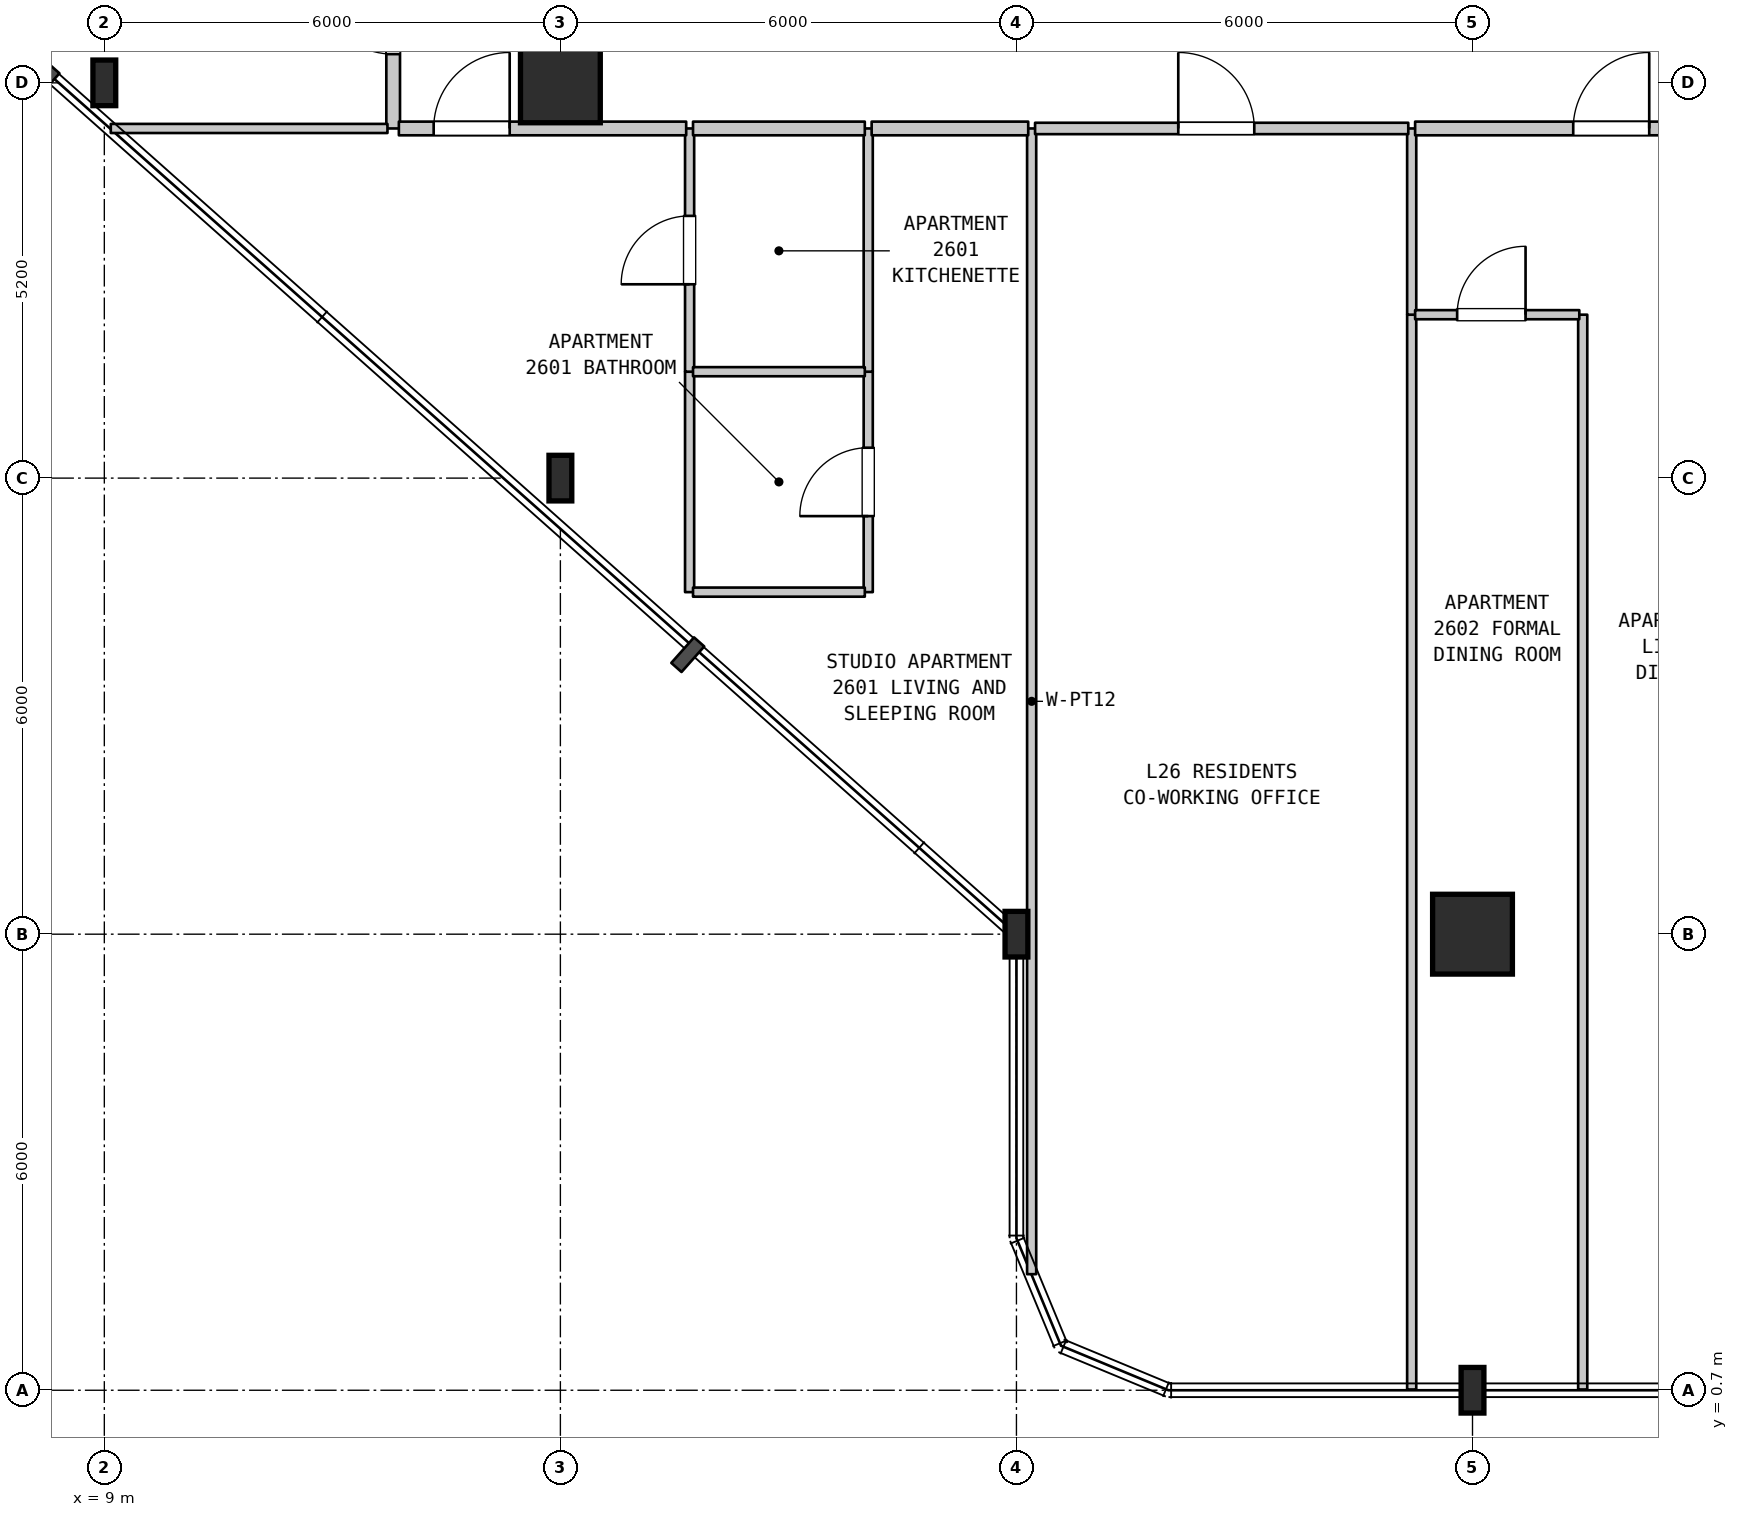
"""IFC4 building model, lengths in metres.
Left out: names, types, materials, properties, quantities, classifications, styles, units other than length and angle.
Written with IfcOpenShell. Run it as: python <this file> out.ifc"""

import sys

from ifc_helpers import new_model, si_unit, direction, frame, frame_2d, origin, origin_2d, place, context, subcontext, project, spatial, rectangle, i_section, extrude, element, fill, save


model = new_model("IFC4")
c1 = context("Model", 3, precision=1e-05, world=origin(), true_north=direction((0.0, 1.0)))
c2 = subcontext(c1, "Body", "Model", "MODEL_VIEW")
j1 = project(units=[si_unit("LENGTHUNIT", "METRE"), si_unit("PLANEANGLEUNIT", "RADIAN")], contexts=[c1])
p1 = place(None, origin())
s1 = spatial("IfcSite", under=j1, at=p1, CompositionType="ELEMENT")
p2 = place(p1, origin())
s2 = spatial("IfcBuilding", under=s1, at=p2, CompositionType="ELEMENT")
p3 = place(p2, frame((0.0, 0.0, 109.4)))
s3 = spatial("IfcBuildingStorey", under=s2, at=p3, CompositionType="ELEMENT", Elevation=109.4)
for number, where, z_axis, x_axis in (
    (1, (9.0, 17.9, 0.0), (0.0, 0.0, 1.0), (1.0, 0.0, 0.0)),
    (2, (15.0, 12.7, 0.0), (0.0, 0.0, 1.0), (1.0, 0.0, 0.0)),
):
    element("IfcColumn", number, at=place(p3, frame(where, z_axis=z_axis, x_axis=x_axis)), inside=s3, PredefinedType="COLUMN", context=c2, shape_type="SweptSolid", body=[
        extrude(i_section(OverallWidth=0.3, OverallDepth=0.6, WebThickness=0.015, FlangeThickness=0.03, FilletRadius=0.027, at=origin_2d()), origin(), (0.0, 0.0, 1.0), 3.7),
    ])
p4 = place(p3, frame((15.0, 17.9, 0.0), z_axis=(0.0, 0.0, 1.0), x_axis=(1.0, 0.0, 0.0)))
e3 = element("IfcColumn", 3, at=p4, inside=s3, PredefinedType="COLUMN", context=c2, shape_type="SweptSolid", body=[
    extrude(rectangle(XDim=1.05, YDim=1.05, at=origin_2d()), origin(), (0.0, 0.0, 1.0), 3.7),
])
for number, where, z_axis, x_axis in (
    (4, (21.0, 6.7, 0.0), (0.0, 0.0, 1.0), (1.0, 0.0, 0.0)),
    (5, (27.0, 0.7, 0.0), (0.0, 0.0, 1.0), (1.0, 0.0, 0.0)),
):
    element("IfcColumn", number, at=place(p3, frame(where, z_axis=z_axis, x_axis=x_axis)), inside=s3, PredefinedType="COLUMN", context=c2, shape_type="SweptSolid", body=[
        extrude(i_section(OverallWidth=0.3, OverallDepth=0.6, WebThickness=0.015, FlangeThickness=0.03, FilletRadius=0.027, at=origin_2d()), origin(), (0.0, 0.0, 1.0), 3.7),
    ])
p5 = place(p3, frame((27.0, 6.7, 0.0), z_axis=(0.0, 0.0, 1.0), x_axis=(1.0, 0.0, 0.0)))
e6 = element("IfcColumn", 6, at=p5, inside=s3, PredefinedType="COLUMN", context=c2, shape_type="SweptSolid", body=[
    extrude(rectangle(XDim=1.05, YDim=1.05, at=origin_2d()), origin(), (0.0, 0.0, 1.0), 3.7),
])
p6 = place(p3, frame((12.8, 17.3, 0.0), z_axis=(0.0, 0.0, 1.0), x_axis=(0.0, 1.0, 0.0)))
e7 = element("IfcWall", 7, at=p6, inside=s3, PredefinedType="STANDARD", context=c2, shape_type="SweptSolid", body=[
    extrude(rectangle(XDim=3.1, YDim=0.18, at=frame_2d((1.55, 0.0))), origin(), (0.0, 0.0, 1.0), 3.385),
])
p7 = place(p6, frame((0.978, 0.0, 0.0)))
e8 = element("IfcOpeningElement", 8, at=p7, cuts=e7, PredefinedType="OPENING", context=c2, shape_type="SweptSolid", body=[
    extrude(rectangle(XDim=1.0, YDim=2.15, at=frame_2d((0.5, 1.075))), frame((0.0, 0.1, 0.0), z_axis=(0.0, -1.0, 0.0), x_axis=(1.0, 0.0, 0.0)), (0.0, 0.0, 1.0), 0.2),
])
p8 = place(p3, frame((16.7, 11.2, 0.0), z_axis=(0.0, 0.0, 1.0), x_axis=(0.0, 1.0, 0.0)))
e9 = element("IfcWall", 9, at=p8, inside=s3, PredefinedType="PARTITIONING", context=c2, shape_type="SweptSolid", body=[
    extrude(rectangle(XDim=2.9, YDim=0.12, at=frame_2d((1.45, 0.0))), origin(), (0.0, 0.0, 1.0), 3.385),
])
p9 = place(p3, frame((16.7, 14.1, 0.0), z_axis=(0.0, 0.0, 1.0), x_axis=(0.0, 1.0, 0.0)))
e10 = element("IfcWall", 10, at=p9, inside=s3, PredefinedType="PARTITIONING", context=c2, shape_type="SweptSolid", body=[
    extrude(rectangle(XDim=3.2, YDim=0.12, at=frame_2d((1.6, 0.0))), origin(), (0.0, 0.0, 1.0), 3.385),
])
p10 = place(p9, frame((1.15, 0.0, 0.0)))
e11 = element("IfcOpeningElement", 11, at=p10, cuts=e10, PredefinedType="OPENING", context=c2, shape_type="SweptSolid", body=[
    extrude(rectangle(XDim=0.9, YDim=2.15, at=frame_2d((0.45, 1.075))), frame((0.0, 0.07, 0.0), z_axis=(0.0, -1.0, 0.0), x_axis=(1.0, 0.0, 0.0)), (0.0, 0.0, 1.0), 0.14),
])
p11 = place(p3, frame((19.05, 11.2, 0.0), z_axis=(0.0, 0.0, 1.0), x_axis=(0.0, 1.0, 0.0)))
e12 = element("IfcWall", 12, at=p11, inside=s3, PredefinedType="PARTITIONING", context=c2, shape_type="SweptSolid", body=[
    extrude(rectangle(XDim=2.9, YDim=0.12, at=frame_2d((1.45, 0.0))), origin(), (0.0, 0.0, 1.0), 3.385),
])
p12 = place(p11, frame((1.0, 0.0, 0.0)))
e13 = element("IfcOpeningElement", 13, at=p12, cuts=e12, PredefinedType="OPENING", context=c2, shape_type="SweptSolid", body=[
    extrude(rectangle(XDim=0.9, YDim=2.1, at=frame_2d((0.45, 1.05))), frame((0.0, 0.07, 0.0), z_axis=(0.0, -1.0, 0.0), x_axis=(1.0, 0.0, 0.0)), (0.0, 0.0, 1.0), 0.14),
])
p13 = place(p3, frame((19.05, 14.1, 0.0), z_axis=(0.0, 0.0, 1.0), x_axis=(0.0, 1.0, 0.0)))
e14 = element("IfcWall", 14, at=p13, inside=s3, PredefinedType="PARTITIONING", context=c2, shape_type="SweptSolid", body=[
    extrude(rectangle(XDim=3.2, YDim=0.12, at=frame_2d((1.6, 0.0))), origin(), (0.0, 0.0, 1.0), 3.385),
])
p14 = place(p3, frame((21.2, 2.227, 0.0), z_axis=(0.0, 0.0, 1.0), x_axis=(0.0, 1.0, 0.0)))
e15 = element("IfcWall", 15, at=p14, inside=s3, PredefinedType="PARTITIONING", context=c2, shape_type="SweptSolid", body=[
    extrude(rectangle(XDim=15.073, YDim=0.12, at=frame_2d((7.537, 0.0))), origin(), (0.0, 0.0, 1.0), 3.385),
])
p15 = place(p3, frame((26.2, 0.71, 0.0), z_axis=(0.0, 0.0, 1.0), x_axis=(0.0, 1.0, 0.0)))
e16 = element("IfcWall", 16, at=p15, inside=s3, PredefinedType="PARTITIONING", context=c2, shape_type="SweptSolid", body=[
    extrude(rectangle(XDim=14.14, YDim=0.12, at=frame_2d((7.07, 0.0))), origin(), (0.0, 0.0, 1.0), 3.385),
])
p16 = place(p3, frame((26.2, 14.85, 0.0), z_axis=(0.0, 0.0, 1.0), x_axis=(0.0, 1.0, 0.0)))
e17 = element("IfcWall", 17, at=p16, inside=s3, PredefinedType="PARTITIONING", context=c2, shape_type="SweptSolid", body=[
    extrude(rectangle(XDim=2.45, YDim=0.12, at=frame_2d((1.225, 0.0))), origin(), (0.0, 0.0, 1.0), 3.385),
])
p17 = place(p3, frame((28.45, 0.71, 0.0), z_axis=(0.0, 0.0, 1.0), x_axis=(0.0, 1.0, 0.0)))
e18 = element("IfcWall", 18, at=p17, inside=s3, PredefinedType="PARTITIONING", context=c2, shape_type="SweptSolid", body=[
    extrude(rectangle(XDim=14.14, YDim=0.12, at=frame_2d((7.07, 0.0))), origin(), (0.0, 0.0, 1.0), 3.385),
])
for number, where, z_axis, x_axis in (
    (19, (16.745, 11.2, 0.0), (0.0, 0.0, 1.0), (1.0, 0.0, 0.0)),
    (20, (16.745, 14.1, 0.0), (0.0, 0.0, 1.0), (1.0, 0.0, 0.0)),
):
    element("IfcWall", number, at=place(p3, frame(where, z_axis=z_axis, x_axis=x_axis)), inside=s3, PredefinedType="PARTITIONING", context=c2, shape_type="SweptSolid", body=[
        extrude(rectangle(XDim=2.26, YDim=0.12, at=frame_2d((1.13, 0.0))), origin(), (0.0, 0.0, 1.0), 3.385),
    ])
p18 = place(p3, frame((26.245, 14.85, 0.0), z_axis=(0.0, 0.0, 1.0), x_axis=(1.0, 0.0, 0.0)))
e21 = element("IfcWall", 21, at=p18, inside=s3, PredefinedType="PARTITIONING", context=c2, shape_type="SweptSolid", body=[
    extrude(rectangle(XDim=2.16, YDim=0.12, at=frame_2d((1.08, 0.0))), origin(), (0.0, 0.0, 1.0), 3.385),
])
p19 = place(p18, frame((0.553, 0.0, 0.0)))
e22 = element("IfcOpeningElement", 22, at=p19, cuts=e21, PredefinedType="OPENING", context=c2, shape_type="SweptSolid", body=[
    extrude(rectangle(XDim=0.9, YDim=2.15, at=frame_2d((0.45, 1.075))), frame((0.0, 0.07, 0.0), z_axis=(0.0, -1.0, 0.0), x_axis=(1.0, 0.0, 0.0)), (0.0, 0.0, 1.0), 0.14),
])
p20 = place(p3, frame((9.085, 17.3, 0.0), z_axis=(0.0, 0.0, 1.0), x_axis=(1.0, 0.0, 0.0)))
e23 = element("IfcWall", 23, at=p20, inside=s3, PredefinedType="PARTITIONING", context=c2, shape_type="SweptSolid", body=[
    extrude(rectangle(XDim=3.64, YDim=0.12, at=frame_2d((1.82, 0.0))), origin(), (0.0, 0.0, 1.0), 3.385),
])
p21 = place(p3, frame((12.875, 17.3, 0.0), z_axis=(0.0, 0.0, 1.0), x_axis=(1.0, 0.0, 0.0)))
e24 = element("IfcWall", 24, at=p21, inside=s3, PredefinedType="STANDARD", context=c2, shape_type="SweptSolid", body=[
    extrude(rectangle(XDim=3.78, YDim=0.18, at=frame_2d((1.89, 0.0))), origin(), (0.0, 0.0, 1.0), 3.385),
])
p22 = place(p21, frame((0.458, 0.0, 0.0)))
e25 = element("IfcOpeningElement", 25, at=p22, cuts=e24, PredefinedType="OPENING", context=c2, shape_type="SweptSolid", body=[
    extrude(rectangle(XDim=1.0, YDim=2.15, at=frame_2d((0.5, 1.075))), frame((0.0, 0.1, 0.0), z_axis=(0.0, -1.0, 0.0), x_axis=(1.0, 0.0, 0.0)), (0.0, 0.0, 1.0), 0.2),
])
p23 = place(p3, frame((16.745, 17.3, 0.0), z_axis=(0.0, 0.0, 1.0), x_axis=(1.0, 0.0, 0.0)))
e26 = element("IfcWall", 26, at=p23, inside=s3, PredefinedType="STANDARD", context=c2, shape_type="SweptSolid", body=[
    extrude(rectangle(XDim=2.26, YDim=0.18, at=frame_2d((1.13, 0.0))), origin(), (0.0, 0.0, 1.0), 3.385),
])
p24 = place(p3, frame((19.095, 17.3, 0.0), z_axis=(0.0, 0.0, 1.0), x_axis=(1.0, 0.0, 0.0)))
e27 = element("IfcWall", 27, at=p24, inside=s3, PredefinedType="STANDARD", context=c2, shape_type="SweptSolid", body=[
    extrude(rectangle(XDim=2.06, YDim=0.18, at=frame_2d((1.03, 0.0))), origin(), (0.0, 0.0, 1.0), 3.385),
])
p25 = place(p3, frame((21.245, 17.3, 0.0), z_axis=(0.0, 0.0, 1.0), x_axis=(1.0, 0.0, 0.0)))
e28 = element("IfcWall", 28, at=p25, inside=s3, PredefinedType="STANDARD", context=c2, shape_type="SweptSolid", body=[
    extrude(rectangle(XDim=4.91, YDim=0.15, at=frame_2d((2.455, 0.0))), origin(), (0.0, 0.0, 1.0), 3.385),
])
p26 = place(p25, frame((1.884, 0.0, 0.0)))
e29 = element("IfcOpeningElement", 29, at=p26, cuts=e28, PredefinedType="OPENING", context=c2, shape_type="SweptSolid", body=[
    extrude(rectangle(XDim=1.0, YDim=2.15, at=frame_2d((0.5, 1.075))), frame((0.0, 0.085, 0.0), z_axis=(0.0, -1.0, 0.0), x_axis=(1.0, 0.0, 0.0)), (0.0, 0.0, 1.0), 0.17),
])
p27 = place(p3, frame((26.245, 17.3, 0.0), z_axis=(0.0, 0.0, 1.0), x_axis=(1.0, 0.0, 0.0)))
e30 = element("IfcWall", 30, at=p27, inside=s3, PredefinedType="STANDARD", context=c2, shape_type="SweptSolid", body=[
    extrude(rectangle(XDim=5.095, YDim=0.18, at=frame_2d((2.547, 0.0))), origin(), (0.0, 0.0, 1.0), 3.385),
])
p28 = place(p27, frame((2.08, 0.0, 0.0)))
e31 = element("IfcOpeningElement", 31, at=p28, cuts=e30, PredefinedType="OPENING", context=c2, shape_type="SweptSolid", body=[
    extrude(rectangle(XDim=1.0, YDim=2.15, at=frame_2d((0.5, 1.075))), frame((0.0, 0.1, 0.0), z_axis=(0.0, -1.0, 0.0), x_axis=(1.0, 0.0, 0.0)), (0.0, 0.0, 1.0), 0.2),
])
p29 = place(p7, origin())
e32 = element("IfcDoor", 32, at=p29, inside=s3, OperationType="SINGLE_SWING_RIGHT", PredefinedType="DOOR", context=c2, shape_type="SweptSolid", body=[
    extrude(rectangle(XDim=1.0, YDim=2.15, at=frame_2d((0.5, 1.075))), frame((0.0, 0.025, 0.0), z_axis=(0.0, -1.0, 0.0), x_axis=(1.0, 0.0, 0.0)), (0.0, 0.0, 1.0), 0.05),
])
fill(e8, e32)
p30 = place(p10, origin())
e33 = element("IfcDoor", 33, at=p30, inside=s3, OperationType="SINGLE_SWING_LEFT", PredefinedType="DOOR", context=c2, shape_type="SweptSolid", body=[
    extrude(rectangle(XDim=0.9, YDim=2.15, at=frame_2d((0.45, 1.075))), frame((0.0, 0.025, 0.0), z_axis=(0.0, -1.0, 0.0), x_axis=(1.0, 0.0, 0.0)), (0.0, 0.0, 1.0), 0.05),
])
fill(e11, e33)
p31 = place(p12, origin())
e34 = element("IfcDoor", 34, at=p31, inside=s3, OperationType="SINGLE_SWING_LEFT", PredefinedType="DOOR", context=c2, shape_type="SweptSolid", body=[
    extrude(rectangle(XDim=0.9, YDim=2.1, at=frame_2d((0.45, 1.05))), frame((0.0, 0.025, 0.0), z_axis=(0.0, -1.0, 0.0), x_axis=(1.0, 0.0, 0.0)), (0.0, 0.0, 1.0), 0.05),
])
fill(e13, e34)
p32 = place(p19, origin())
e35 = element("IfcDoor", 35, at=p32, inside=s3, OperationType="SINGLE_SWING_RIGHT", PredefinedType="DOOR", context=c2, shape_type="SweptSolid", body=[
    extrude(rectangle(XDim=0.9, YDim=2.15, at=frame_2d((0.45, 1.075))), frame((0.0, 0.025, 0.0), z_axis=(0.0, -1.0, 0.0), x_axis=(1.0, 0.0, 0.0)), (0.0, 0.0, 1.0), 0.05),
])
fill(e22, e35)
p33 = place(p22, origin())
e36 = element("IfcDoor", 36, at=p33, inside=s3, OperationType="SINGLE_SWING_RIGHT", PredefinedType="DOOR", context=c2, shape_type="SweptSolid", body=[
    extrude(rectangle(XDim=1.0, YDim=2.15, at=frame_2d((0.5, 1.075))), frame((0.0, 0.025, 0.0), z_axis=(0.0, -1.0, 0.0), x_axis=(1.0, 0.0, 0.0)), (0.0, 0.0, 1.0), 0.05),
])
fill(e25, e36)
p34 = place(p26, origin())
e37 = element("IfcDoor", 37, at=p34, inside=s3, OperationType="SINGLE_SWING_LEFT", PredefinedType="DOOR", context=c2, shape_type="SweptSolid", body=[
    extrude(rectangle(XDim=1.0, YDim=2.15, at=frame_2d((0.5, 1.075))), frame((0.0, 0.025, 0.0), z_axis=(0.0, -1.0, 0.0), x_axis=(1.0, 0.0, 0.0)), (0.0, 0.0, 1.0), 0.05),
])
fill(e29, e37)
p35 = place(p28, origin())
e38 = element("IfcDoor", 38, at=p35, inside=s3, OperationType="SINGLE_SWING_RIGHT", PredefinedType="DOOR", context=c2, shape_type="SweptSolid", body=[
    extrude(rectangle(XDim=1.0, YDim=2.15, at=frame_2d((0.5, 1.075))), frame((0.0, 0.025, 0.0), z_axis=(0.0, -1.0, 0.0), x_axis=(1.0, 0.0, 0.0)), (0.0, 0.0, 1.0), 0.05),
])
fill(e31, e38)
save(model, sys.argv[1])
